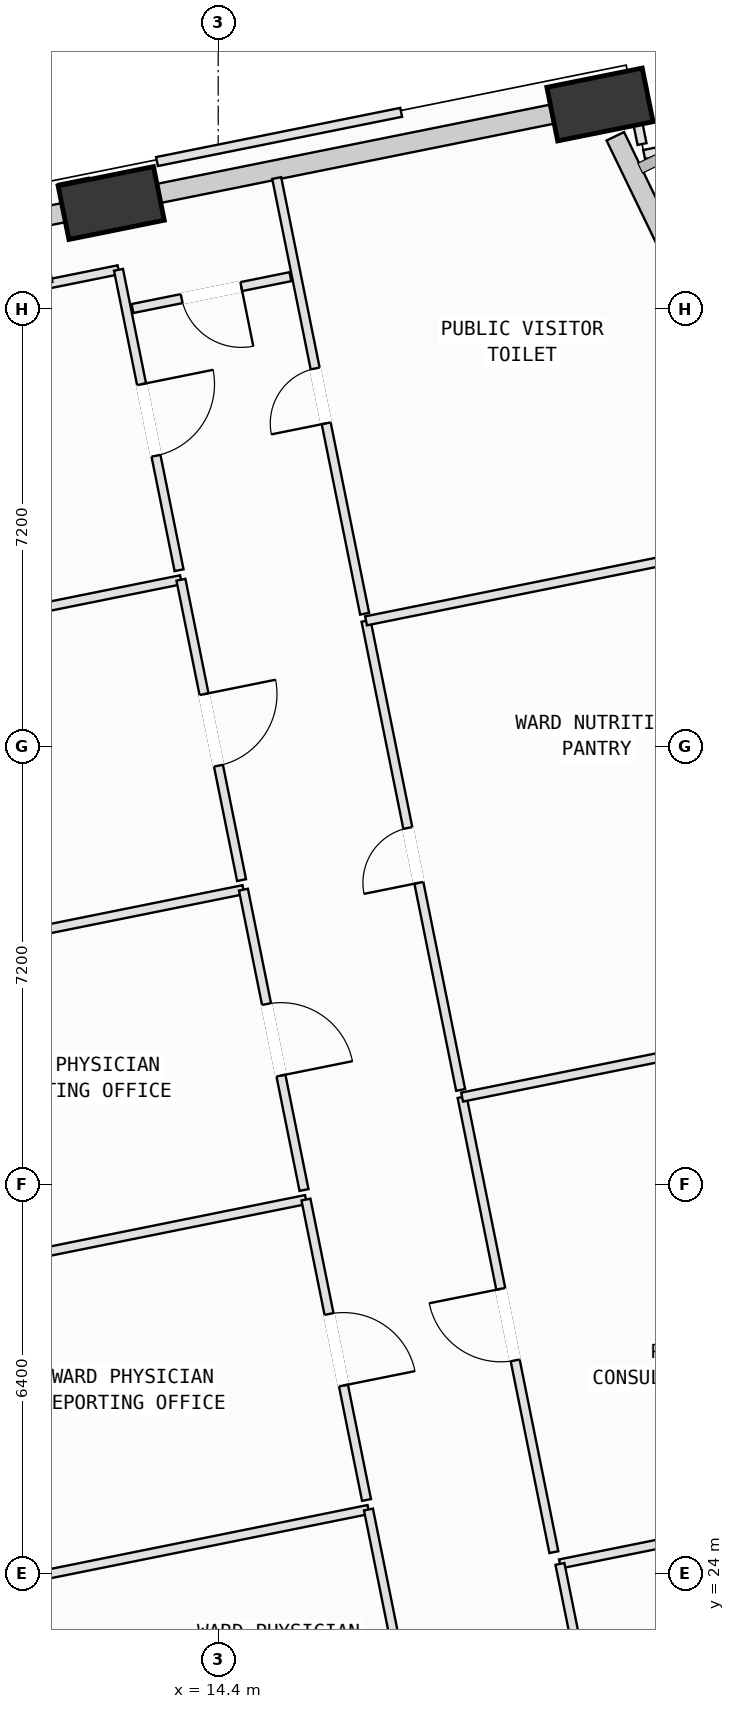
"""IFC4 building model, lengths in metres.
Left out: names, types, materials, properties, quantities, classifications, styles, units other than length and angle.
Written with IfcOpenShell. Run it as: python <this file> out.ifc"""

import sys

from ifc_helpers import new_model, si_unit, direction, frame, frame_2d, origin, origin_2d, place, context, subcontext, project, spatial, rectangle, extrude, element, fill, save


model = new_model("IFC4")
c1 = context("Model", 3, precision=1e-05, world=origin(), true_north=direction((0.0, 1.0)))
c2 = subcontext(c1, "Body", "Model", "MODEL_VIEW")
j1 = project(units=[si_unit("LENGTHUNIT", "METRE"), si_unit("PLANEANGLEUNIT", "RADIAN")], contexts=[c1])
p1 = place(None, origin())
s1 = spatial("IfcSite", under=j1, at=p1, CompositionType="ELEMENT")
p2 = place(p1, origin())
s2 = spatial("IfcBuilding", under=s1, at=p2, CompositionType="ELEMENT")
p3 = place(p2, frame((0.0, 0.0, 71.0)))
s3 = spatial("IfcBuildingStorey", under=s2, at=p3, CompositionType="ELEMENT", Elevation=71.0)
p4 = place(p3, frame((20.678, 48.157, 0.002), z_axis=(-0.095750725554, -0.054038139343, 0.993937461842), x_axis=(0.652889004976, -0.75714178031, 0.021731812851)))
e1 = element("IfcColumn", 1, at=p4, inside=s3, PredefinedType="COLUMN", context=c2, shape_type="SweptSolid", body=[
    extrude(rectangle(XDim=1.6, YDim=0.9, at=origin_2d()), origin(), (0.0, 0.0, 1.0), 4.021),
])
p5 = place(p3, frame((12.64, 46.536, 0.002), z_axis=(-0.088678638847, -0.086981440017, 0.992255172879), x_axis=(0.826442975623, -0.562484839864, 0.024552249733)))
e2 = element("IfcColumn", 2, at=p5, inside=s3, PredefinedType="COLUMN", context=c2, shape_type="SweptSolid", body=[
    extrude(rectangle(XDim=1.6, YDim=0.9, at=origin_2d()), origin(), (0.0, 0.0, 1.0), 4.028),
])
p6 = place(p3, frame((20.931, 47.634, 0.0), z_axis=(0.0, 0.0, 1.0), x_axis=(0.434947356849, -0.900455882745, 0.0)))
e3 = element("IfcWall", 3, at=p6, inside=s3, PredefinedType="SOLIDWALL", context=c2, shape_type="SweptSolid", body=[
    extrude(rectangle(XDim=4.889, YDim=0.32, at=frame_2d((2.444, 0.0))), origin(), (0.0, 0.0, 1.0), 3.165),
])
p7 = place(p6, frame((2.215, 0.0, 0.75)))
e4 = element("IfcOpeningElement", 4, at=p7, cuts=e3, PredefinedType="OPENING", context=c2, shape_type="SweptSolid", body=[
    extrude(rectangle(XDim=1.2, YDim=1.75, at=frame_2d((0.6, 0.875))), frame((0.0, 0.17, 0.0), z_axis=(0.0, -1.0, 0.0), x_axis=(1.0, 0.0, 0.0)), (0.0, 0.0, 1.0), 0.34),
])
p8 = place(p3, frame((13.015, 46.612, 0.0), z_axis=(0.0, 0.0, 1.0), x_axis=(0.98026972201, 0.197664544393, 0.0)))
e5 = element("IfcWall", 5, at=p8, inside=s3, PredefinedType="SOLIDWALL", context=c2, shape_type="SweptSolid", body=[
    extrude(rectangle(XDim=7.003, YDim=0.32, at=frame_2d((3.501, 0.0))), origin(), (0.0, 0.0, 1.0), 3.165),
])
p9 = place(p3, frame((4.958, 44.987, 0.0), z_axis=(0.0, 0.0, 1.0), x_axis=(0.980272459047, 0.197650970234, 0.0)))
e6 = element("IfcWall", 6, at=p9, inside=s3, PredefinedType="SOLIDWALL", context=c2, shape_type="SweptSolid", body=[
    extrude(rectangle(XDim=7.034, YDim=0.32, at=frame_2d((3.517, 0.0))), origin(), (0.0, 0.0, 1.0), 3.165),
])
p10 = place(p3, frame((6.122, 22.881, 0.0), z_axis=(0.0, 0.0, 1.0), x_axis=(0.980278085225, 0.197623064515, 0.0)))
e7 = element("IfcWall", 7, at=p10, inside=s3, PredefinedType="PARTITIONING", context=c2, shape_type="SweptSolid", body=[
    extrude(rectangle(XDim=10.965, YDim=0.15, at=frame_2d((5.483, 0.0))), origin(), (0.0, 0.0, 1.0), 3.78),
])
p11 = place(p3, frame((16.871, 25.048, 0.0), z_axis=(0.0, 0.0, 1.0), x_axis=(0.197650705998, -0.980272512324, 0.0)))
e8 = element("IfcWall", 8, at=p11, inside=s3, PredefinedType="PARTITIONING", context=c2, shape_type="SweptSolid", body=[
    extrude(rectangle(XDim=4.558, YDim=0.15, at=frame_2d((2.279, 0.0))), origin(), (0.0, 0.0, 1.0), 3.78),
])
p12 = place(p3, frame((4.737, 27.906, 0.0), z_axis=(0.0, 0.0, 1.0), x_axis=(0.980260288007, 0.197711324301, 0.0)))
e9 = element("IfcWall", 9, at=p12, inside=s3, PredefinedType="PARTITIONING", context=c2, shape_type="SweptSolid", body=[
    extrude(rectangle(XDim=11.33, YDim=0.15, at=frame_2d((5.665, 0.0))), origin(), (0.0, 0.0, 1.0), 3.78),
])
p13 = place(p3, frame((15.843, 30.146, 0.0), z_axis=(0.0, 0.0, 1.0), x_axis=(0.197624916703, -0.980277711824, 0.0)))
e10 = element("IfcWall", 10, at=p13, inside=s3, PredefinedType="PARTITIONING", context=c2, shape_type="SweptSolid", body=[
    extrude(rectangle(XDim=5.04, YDim=0.15, at=frame_2d((2.52, 0.0))), origin(), (0.0, 0.0, 1.0), 3.78),
])
p14 = place(p13, frame((1.92, 0.0, 0.0)))
e11 = element("IfcOpeningElement", 11, at=p14, cuts=e10, PredefinedType="OPENING", context=c2, shape_type="SweptSolid", body=[
    extrude(rectangle(XDim=1.2, YDim=2.15, at=frame_2d((0.6, 1.075))), frame((0.0, 0.085, 0.0), z_axis=(0.0, -1.0, 0.0), x_axis=(1.0, 0.0, 0.0)), (0.0, 0.0, 1.0), 0.17),
])
p15 = place(p3, frame((4.067, 33.076, 0.0), z_axis=(0.0, 0.0, 1.0), x_axis=(0.980274606561, 0.197640319095, 0.0)))
e12 = element("IfcWall", 12, at=p15, inside=s3, PredefinedType="PARTITIONING", context=c2, shape_type="SweptSolid", body=[
    extrude(rectangle(XDim=10.964, YDim=0.15, at=frame_2d((5.482, 0.0))), origin(), (0.0, 0.0, 1.0), 3.78),
])
p16 = place(p3, frame((14.815, 35.243, 0.0), z_axis=(0.0, 0.0, 1.0), x_axis=(0.197662458337, -0.980270142646, 0.0)))
e13 = element("IfcWall", 13, at=p16, inside=s3, PredefinedType="PARTITIONING", context=c2, shape_type="SweptSolid", body=[
    extrude(rectangle(XDim=5.039, YDim=0.15, at=frame_2d((2.52, 0.0))), origin(), (0.0, 0.0, 1.0), 3.78),
])
p17 = place(p16, frame((1.92, 0.0, 0.0)))
e14 = element("IfcOpeningElement", 14, at=p17, cuts=e13, PredefinedType="OPENING", context=c2, shape_type="SweptSolid", body=[
    extrude(rectangle(XDim=1.2, YDim=2.15, at=frame_2d((0.6, 1.075))), frame((0.0, 0.085, 0.0), z_axis=(0.0, -1.0, 0.0), x_axis=(1.0, 0.0, 0.0)), (0.0, 0.0, 1.0), 0.17),
])
p18 = place(p3, frame((3.039, 38.173, 0.0), z_axis=(0.0, 0.0, 1.0), x_axis=(0.980274606561, 0.197640319095, 0.0)))
e15 = element("IfcWall", 15, at=p18, inside=s3, PredefinedType="PARTITIONING", context=c2, shape_type="SweptSolid", body=[
    extrude(rectangle(XDim=10.964, YDim=0.15, at=frame_2d((5.482, 0.0))), origin(), (0.0, 0.0, 1.0), 3.78),
])
p19 = place(p3, frame((13.787, 40.34, 0.0), z_axis=(0.0, 0.0, 1.0), x_axis=(0.19779272105, -0.980243867361, 0.0)))
e16 = element("IfcWall", 16, at=p19, inside=s3, PredefinedType="PARTITIONING", context=c2, shape_type="SweptSolid", body=[
    extrude(rectangle(XDim=5.04, YDim=0.15, at=frame_2d((2.52, 0.0))), origin(), (0.0, 0.0, 1.0), 3.78),
])
p20 = place(p19, frame((1.92, 0.0, 0.0)))
e17 = element("IfcOpeningElement", 17, at=p20, cuts=e16, PredefinedType="OPENING", context=c2, shape_type="SweptSolid", body=[
    extrude(rectangle(XDim=1.2, YDim=2.15, at=frame_2d((0.6, 1.075))), frame((0.0, 0.085, 0.0), z_axis=(0.0, -1.0, 0.0), x_axis=(1.0, 0.0, 0.0)), (0.0, 0.0, 1.0), 0.17),
])
p21 = place(p3, frame((4.147, 43.702, 0.0), z_axis=(0.0, 0.0, 1.0), x_axis=(0.980284600803, 0.197590742263, 0.0)))
e18 = element("IfcWall", 18, at=p21, inside=s3, PredefinedType="PARTITIONING", context=c2, shape_type="SweptSolid", body=[
    extrude(rectangle(XDim=8.786, YDim=0.15, at=frame_2d((4.393, 0.0))), origin(), (0.0, 0.0, 1.0), 3.78),
])
p22 = place(p3, frame((12.76, 45.438, 0.0), z_axis=(0.0, 0.0, 1.0), x_axis=(0.197624916703, -0.980277711824, 0.0)))
e19 = element("IfcWall", 19, at=p22, inside=s3, PredefinedType="PARTITIONING", context=c2, shape_type="SweptSolid", body=[
    extrude(rectangle(XDim=5.04, YDim=0.15, at=frame_2d((2.52, 0.0))), origin(), (0.0, 0.0, 1.0), 2.865),
])
p23 = place(p22, frame((1.92, 0.0, 0.0)))
e20 = element("IfcOpeningElement", 20, at=p23, cuts=e19, PredefinedType="OPENING", context=c2, shape_type="SweptSolid", body=[
    extrude(rectangle(XDim=1.2, YDim=2.15, at=frame_2d((0.6, 1.075))), frame((0.0, 0.085, 0.0), z_axis=(0.0, -1.0, 0.0), x_axis=(1.0, 0.0, 0.0)), (0.0, 0.0, 1.0), 0.17),
])
p24 = place(p3, frame((20.02, 24.153, 0.0), z_axis=(0.0, 0.0, 1.0), x_axis=(0.980251267329, 0.197756043903, 0.0)))
e21 = element("IfcWall", 21, at=p24, inside=s3, PredefinedType="PARTITIONING", context=c2, shape_type="SweptSolid", body=[
    extrude(rectangle(XDim=6.755, YDim=0.15, at=frame_2d((3.378, 0.0))), origin(), (0.0, 0.0, 1.0), 3.78),
])
p25 = place(p3, frame((20.74, 20.58, 0.0), z_axis=(0.0, 0.0, 1.0), x_axis=(-0.197532878548, 0.980296262307, 0.0)))
e22 = element("IfcWall", 22, at=p25, inside=s3, PredefinedType="PARTITIONING", context=c2, shape_type="SweptSolid", body=[
    extrude(rectangle(XDim=3.645, YDim=0.15, at=frame_2d((1.822, 0.0))), origin(), (0.0, 0.0, 1.0), 3.78),
])
p26 = place(p3, frame((19.92, 24.347, 0.0), z_axis=(0.0, 0.0, 1.0), x_axis=(-0.197653276626, 0.980271994009, 0.0)))
e23 = element("IfcWall", 23, at=p26, inside=s3, PredefinedType="PARTITIONING", context=c2, shape_type="SweptSolid", body=[
    extrude(rectangle(XDim=7.635, YDim=0.15, at=frame_2d((3.817, 0.0))), origin(), (0.0, 0.0, 1.0), 3.78),
])
p27 = place(p26, frame((3.217, 0.0, 0.0)))
e24 = element("IfcOpeningElement", 24, at=p27, cuts=e23, PredefinedType="OPENING", context=c2, shape_type="SweptSolid", body=[
    extrude(rectangle(XDim=1.2, YDim=2.15, at=frame_2d((0.6, 1.075))), frame((0.0, 0.085, 0.0), z_axis=(0.0, -1.0, 0.0), x_axis=(1.0, 0.0, 0.0)), (0.0, 0.0, 1.0), 0.17),
])
p28 = place(p3, frame((18.411, 31.831, 0.0), z_axis=(0.0, 0.0, 1.0), x_axis=(0.980272194859, 0.1976522805, 0.0)))
e25 = element("IfcWall", 25, at=p28, inside=s3, PredefinedType="PARTITIONING", context=c2, shape_type="SweptSolid", body=[
    extrude(rectangle(XDim=6.815, YDim=0.15, at=frame_2d((3.407, 0.0))), origin(), (0.0, 0.0, 1.0), 3.78),
])
p29 = place(p3, frame((18.387, 31.949, 0.0), z_axis=(0.0, 0.0, 1.0), x_axis=(-0.197690746024, 0.98026443827, 0.0)))
e26 = element("IfcWall", 26, at=p29, inside=s3, PredefinedType="PARTITIONING", context=c2, shape_type="SweptSolid", body=[
    extrude(rectangle(XDim=7.87, YDim=0.15, at=frame_2d((3.935, 0.0))), origin(), (0.0, 0.0, 1.0), 3.78),
])
p30 = place(p29, frame((3.475, 0.0, 0.0)))
e27 = element("IfcOpeningElement", 27, at=p30, cuts=e26, PredefinedType="OPENING", context=c2, shape_type="SweptSolid", body=[
    extrude(rectangle(XDim=0.92, YDim=2.1, at=frame_2d((0.46, 1.05))), frame((0.0, 0.085, 0.0), z_axis=(0.0, -1.0, 0.0), x_axis=(1.0, 0.0, 0.0)), (0.0, 0.0, 1.0), 0.17),
])
p31 = place(p3, frame((16.831, 39.664, 0.0), z_axis=(0.0, 0.0, 1.0), x_axis=(0.980276392981, 0.197631458435, 0.0)))
e28 = element("IfcWall", 28, at=p31, inside=s3, PredefinedType="PARTITIONING", context=c2, shape_type="SweptSolid", body=[
    extrude(rectangle(XDim=6.815, YDim=0.15, at=frame_2d((3.408, 0.0))), origin(), (0.0, 0.0, 1.0), 3.78),
])
p32 = place(p3, frame((16.808, 39.781, 0.0), z_axis=(0.0, 0.0, 1.0), x_axis=(-0.197804914587, 0.980241406882, 0.0)))
e29 = element("IfcWall", 29, at=p32, inside=s3, PredefinedType="PARTITIONING", context=c2, shape_type="SweptSolid", body=[
    extrude(rectangle(XDim=7.311, YDim=0.15, at=frame_2d((3.655, 0.0))), origin(), (0.0, 0.0, 1.0), 3.78),
])
p33 = place(p32, frame((3.195, 0.0, 0.0)))
e30 = element("IfcOpeningElement", 30, at=p33, cuts=e29, PredefinedType="OPENING", context=c2, shape_type="SweptSolid", body=[
    extrude(rectangle(XDim=0.92, YDim=2.1, at=frame_2d((0.46, 1.05))), frame((0.0, 0.085, 0.0), z_axis=(0.0, -1.0, 0.0), x_axis=(1.0, 0.0, 0.0)), (0.0, 0.0, 1.0), 0.17),
])
p34 = place(p3, frame((19.842, 48.182, 0.0), z_axis=(0.0, 0.0, 1.0), x_axis=(0.980235176833, 0.197835785689, 0.0)))
e31 = element("IfcWall", 31, at=p34, inside=s3, PredefinedType="PARTITIONING", context=c2, shape_type="SweptSolid", body=[
    extrude(rectangle(XDim=1.365, YDim=0.15, at=frame_2d((0.682, 0.0))), origin(), (0.0, 0.0, 1.0), 3.165),
])
p35 = place(p3, frame((21.19, 48.403, 0.0), z_axis=(0.0, 0.0, 1.0), x_axis=(0.196937151026, -0.980416114997, 0.0)))
e32 = element("IfcWall", 32, at=p35, inside=s3, PredefinedType="PARTITIONING", context=c2, shape_type="SweptSolid", body=[
    extrude(rectangle(XDim=0.915, YDim=0.15, at=frame_2d((0.458, 0.0))), origin(), (0.0, 0.0, 1.0), 3.78),
])
p36 = place(p3, frame((21.405, 47.334, 0.0), z_axis=(0.0, 0.0, 1.0), x_axis=(0.980216494426, 0.197928330605, 0.0)))
e33 = element("IfcWall", 33, at=p36, inside=s3, PredefinedType="PARTITIONING", context=c2, shape_type="SweptSolid", body=[
    extrude(rectangle(XDim=1.451, YDim=0.15, at=frame_2d((0.725, 0.0))), origin(), (0.0, 0.0, 1.0), 3.78),
])
p37 = place(p3, frame((11.412, 46.151, 0.0), z_axis=(0.0, 0.0, 1.0), x_axis=(0.197804272123, -0.980241536526, 0.0)))
e34 = element("IfcWall", 34, at=p37, inside=s3, PredefinedType="PARTITIONING", context=c2, shape_type="SweptSolid", body=[
    extrude(rectangle(XDim=0.946, YDim=0.15, at=frame_2d((0.473, 0.0))), origin(), (0.0, 0.0, 1.0), 3.78),
])
p38 = place(p3, frame((15.588, 45.325, 0.0), z_axis=(0.0, 0.0, 1.0), x_axis=(-0.980264069373, -0.197692575216, 0.0)))
e35 = element("IfcWall", 35, at=p38, inside=s3, PredefinedType="PARTITIONING", context=c2, shape_type="SweptSolid", body=[
    extrude(rectangle(XDim=2.65, YDim=0.15, at=frame_2d((1.325, 0.0))), origin(), (0.0, 0.0, 1.0), 3.78),
])
p39 = place(p38, frame((0.825, 0.0, 0.0)))
e36 = element("IfcOpeningElement", 36, at=p39, cuts=e35, PredefinedType="OPENING", context=c2, shape_type="SweptSolid", body=[
    extrude(rectangle(XDim=1.0, YDim=2.12, at=frame_2d((0.5, 1.06))), frame((0.0, 0.085, 0.0), z_axis=(0.0, -1.0, 0.0), x_axis=(1.0, 0.0, 0.0)), (0.0, 0.0, 1.0), 0.17),
])
p40 = place(p3, frame((13.393, 47.218, 0.0), z_axis=(0.0, 0.0, 1.0), x_axis=(0.980256163241, 0.197731773946, 0.0)))
e37 = element("IfcWall", 37, at=p40, inside=s3, PredefinedType="PARTITIONING", context=c2, shape_type="SweptSolid", body=[
    extrude(rectangle(XDim=4.097, YDim=0.15, at=frame_2d((2.048, 0.0))), origin(), (0.0, 0.0, 1.0), 3.78),
])
p41 = place(p14, origin())
e38 = element("IfcDoor", 38, at=p41, inside=s3, OperationType="SINGLE_SWING_RIGHT", PredefinedType="DOOR", context=c2, shape_type="SweptSolid", body=[
    extrude(rectangle(XDim=1.2, YDim=2.15, at=frame_2d((0.6, 1.075))), frame((0.0, 0.025, 0.0), z_axis=(0.0, -1.0, 0.0), x_axis=(1.0, 0.0, 0.0)), (0.0, 0.0, 1.0), 0.05),
])
fill(e11, e38)
p42 = place(p17, origin())
e39 = element("IfcDoor", 39, at=p42, inside=s3, OperationType="SINGLE_SWING_RIGHT", PredefinedType="DOOR", context=c2, shape_type="SweptSolid", body=[
    extrude(rectangle(XDim=1.2, YDim=2.15, at=frame_2d((0.6, 1.075))), frame((0.0, 0.025, 0.0), z_axis=(0.0, -1.0, 0.0), x_axis=(1.0, 0.0, 0.0)), (0.0, 0.0, 1.0), 0.05),
])
fill(e14, e39)
p43 = place(p20, origin())
e40 = element("IfcDoor", 40, at=p43, inside=s3, OperationType="SINGLE_SWING_LEFT", PredefinedType="DOOR", context=c2, shape_type="SweptSolid", body=[
    extrude(rectangle(XDim=1.2, YDim=2.15, at=frame_2d((0.6, 1.075))), frame((0.0, 0.025, 0.0), z_axis=(0.0, -1.0, 0.0), x_axis=(1.0, 0.0, 0.0)), (0.0, 0.0, 1.0), 0.05),
])
fill(e17, e40)
p44 = place(p23, origin())
e41 = element("IfcDoor", 41, at=p44, inside=s3, OperationType="SINGLE_SWING_LEFT", PredefinedType="DOOR", context=c2, shape_type="SweptSolid", body=[
    extrude(rectangle(XDim=1.2, YDim=2.15, at=frame_2d((0.6, 1.075))), frame((0.0, 0.025, 0.0), z_axis=(0.0, -1.0, 0.0), x_axis=(1.0, 0.0, 0.0)), (0.0, 0.0, 1.0), 0.05),
])
fill(e20, e41)
p45 = place(p27, origin())
e42 = element("IfcDoor", 42, at=p45, inside=s3, OperationType="SINGLE_SWING_RIGHT", PredefinedType="DOOR", context=c2, shape_type="SweptSolid", body=[
    extrude(rectangle(XDim=1.2, YDim=2.15, at=frame_2d((0.6, 1.075))), frame((0.0, 0.025, 0.0), z_axis=(0.0, -1.0, 0.0), x_axis=(1.0, 0.0, 0.0)), (0.0, 0.0, 1.0), 0.05),
])
fill(e24, e42)
p46 = place(p30, origin())
e43 = element("IfcDoor", 43, at=p46, inside=s3, OperationType="SINGLE_SWING_LEFT", PredefinedType="DOOR", context=c2, shape_type="SweptSolid", body=[
    extrude(rectangle(XDim=0.92, YDim=2.1, at=frame_2d((0.46, 1.05))), frame((0.0, 0.025, 0.0), z_axis=(0.0, -1.0, 0.0), x_axis=(1.0, 0.0, 0.0)), (0.0, 0.0, 1.0), 0.05),
])
fill(e27, e43)
p47 = place(p33, origin())
e44 = element("IfcDoor", 44, at=p47, inside=s3, OperationType="SINGLE_SWING_LEFT", PredefinedType="DOOR", context=c2, shape_type="SweptSolid", body=[
    extrude(rectangle(XDim=0.92, YDim=2.1, at=frame_2d((0.46, 1.05))), frame((0.0, 0.025, 0.0), z_axis=(0.0, -1.0, 0.0), x_axis=(1.0, 0.0, 0.0)), (0.0, 0.0, 1.0), 0.05),
])
fill(e30, e44)
p48 = place(p39, origin())
e45 = element("IfcDoor", 45, at=p48, inside=s3, OperationType="SINGLE_SWING_LEFT", PredefinedType="DOOR", context=c2, shape_type="SweptSolid", body=[
    extrude(rectangle(XDim=1.0, YDim=2.12, at=frame_2d((0.5, 1.06))), frame((0.0, 0.025, 0.0), z_axis=(0.0, -1.0, 0.0), x_axis=(1.0, 0.0, 0.0)), (0.0, 0.0, 1.0), 0.05),
])
fill(e36, e45)
save(model, sys.argv[1])
